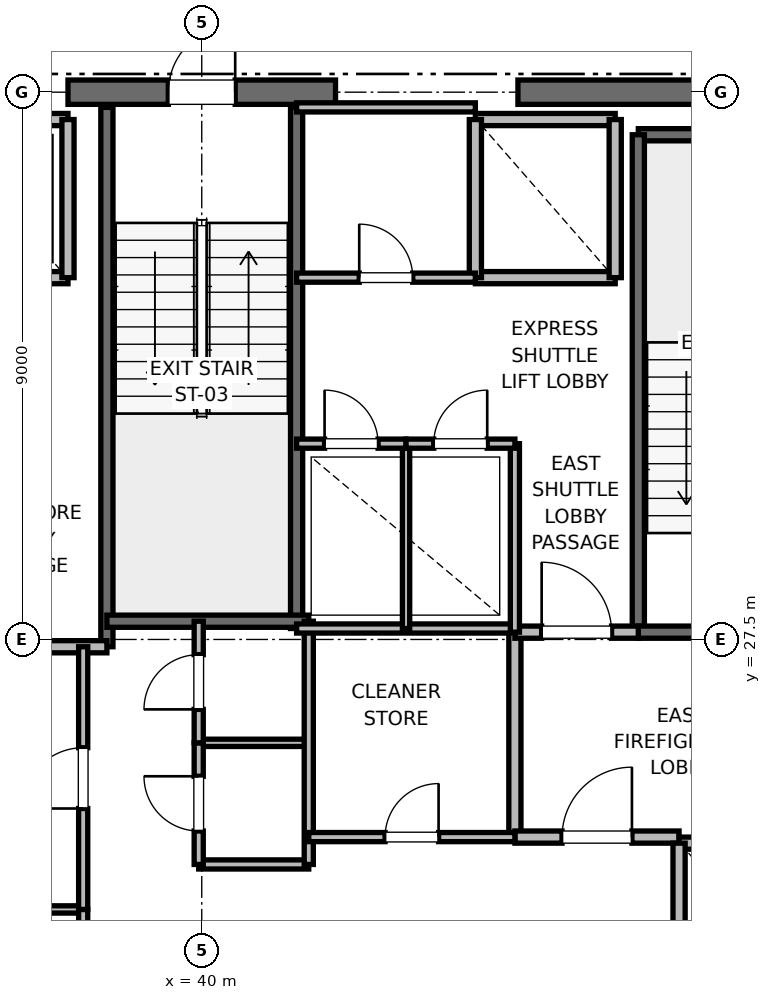
"""IFC4 building model, lengths in metres.
Left out: names, types, materials, properties, quantities, classifications, styles, units other than length and angle.
Written with IfcOpenShell. Run it as: python <this file> out.ifc"""

import sys

from ifc_helpers import new_model, si_unit, direction, frame, frame_2d, origin, place, context, subcontext, project, spatial, rectangle, extrude, element, fill, save


model = new_model("IFC4")
c1 = context("Model", 3, precision=1e-05, world=origin(), true_north=direction((0.0, 1.0)))
c2 = subcontext(c1, "Body", "Model", "MODEL_VIEW")
j1 = project(units=[si_unit("LENGTHUNIT", "METRE"), si_unit("PLANEANGLEUNIT", "RADIAN")], contexts=[c1])
p1 = place(None, origin())
s1 = spatial("IfcSite", under=j1, at=p1, CompositionType="ELEMENT")
p2 = place(p1, origin())
s2 = spatial("IfcBuilding", under=s1, at=p2, CompositionType="ELEMENT")
p3 = place(p2, frame((0.0, 0.0, 314.8)))
s3 = spatial("IfcBuildingStorey", under=s2, at=p3, CompositionType="ELEMENT", Elevation=314.8)
p4 = place(p3, frame((37.8, 36.5, 0.0), z_axis=(0.0, 0.0, 1.0), x_axis=(1.0, 0.0, 0.0)))
e1 = element("IfcWall", 1, at=p4, inside=s3, PredefinedType="SHEAR", context=c2, shape_type="SweptSolid", body=[
    extrude(rectangle(XDim=4.4, YDim=0.4, at=frame_2d((2.2, 0.0))), origin(), (0.0, 0.0, 1.0), 3.785),
])
p5 = place(p4, frame((1.65, 0.0, 0.0)))
e2 = element("IfcOpeningElement", 2, at=p5, cuts=e1, PredefinedType="OPENING", context=c2, shape_type="SweptSolid", body=[
    extrude(rectangle(XDim=1.1, YDim=2.15, at=frame_2d((0.55, 1.075))), frame((0.0, 0.2, 0.0), z_axis=(0.0, -1.0, 0.0), x_axis=(1.0, 0.0, 0.0)), (0.0, 0.0, 1.0), 0.4),
])
p6 = place(p3, frame((45.2, 36.5, 0.0), z_axis=(0.0, 0.0, 1.0), x_axis=(1.0, 0.0, 0.0)))
e3 = element("IfcWall", 3, at=p6, inside=s3, PredefinedType="SHEAR", context=c2, shape_type="SweptSolid", body=[
    extrude(rectangle(XDim=5.8, YDim=0.4, at=frame_2d((2.9, 0.0))), origin(), (0.0, 0.0, 1.0), 3.785),
])
p7 = place(p3, frame((47.18, 35.8, 0.0), z_axis=(0.0, 0.0, 1.0), x_axis=(1.0, 0.0, 0.0)))
e4 = element("IfcWall", 4, at=p7, inside=s3, PredefinedType="SOLIDWALL", context=c2, shape_type="SweptSolid", body=[
    extrude(rectangle(XDim=3.12, YDim=0.2, at=frame_2d((1.56, 0.0))), origin(), (0.0, 0.0, 1.0), 3.785),
])
p8 = place(p3, frame((47.18, 27.62, 0.0), z_axis=(0.0, 0.0, 1.0), x_axis=(0.0, 1.0, 0.0)))
e5 = element("IfcWall", 5, at=p8, inside=s3, PredefinedType="SOLIDWALL", context=c2, shape_type="SweptSolid", body=[
    extrude(rectangle(XDim=8.18, YDim=0.2, at=frame_2d((4.09, 0.0))), origin(), (0.0, 0.0, 1.0), 3.785),
])
p9 = place(p3, frame((47.18, 27.62, 0.0), z_axis=(0.0, 0.0, 1.0), x_axis=(1.0, 0.0, 0.0)))
e6 = element("IfcWall", 6, at=p9, inside=s3, PredefinedType="SOLIDWALL", context=c2, shape_type="SweptSolid", body=[
    extrude(rectangle(XDim=3.12, YDim=0.2, at=frame_2d((1.56, 0.0))), origin(), (0.0, 0.0, 1.0), 3.785),
])
p10 = place(p9, frame((1.01, 0.0, 0.0)))
e7 = element("IfcOpeningElement", 7, at=p10, cuts=e6, PredefinedType="OPENING", context=c2, shape_type="SweptSolid", body=[
    extrude(rectangle(XDim=1.1, YDim=2.15, at=frame_2d((0.55, 1.075))), frame((0.0, 0.1, 0.0), z_axis=(0.0, -1.0, 0.0), x_axis=(1.0, 0.0, 0.0)), (0.0, 0.0, 1.0), 0.2),
])
p11 = place(p3, frame((38.44, 27.38, 0.0), z_axis=(0.0, 0.0, 1.0), x_axis=(0.0, 1.0, 0.0)))
e8 = element("IfcWall", 8, at=p11, inside=s3, PredefinedType="SOLIDWALL", context=c2, shape_type="SweptSolid", body=[
    extrude(rectangle(XDim=8.87, YDim=0.2, at=frame_2d((4.435, 0.0))), origin(), (0.0, 0.0, 1.0), 3.785),
])
p12 = place(p3, frame((41.56, 27.68, 0.0), z_axis=(0.0, 0.0, 1.0), x_axis=(0.0, 1.0, 0.0)))
e9 = element("IfcWall", 9, at=p12, inside=s3, PredefinedType="SOLIDWALL", context=c2, shape_type="SweptSolid", body=[
    extrude(rectangle(XDim=8.57, YDim=0.2, at=frame_2d((4.285, 0.0))), origin(), (0.0, 0.0, 1.0), 3.785),
])
p13 = place(p3, frame((38.44, 27.8, 0.0), z_axis=(0.0, 0.0, 1.0), x_axis=(1.0, 0.0, 0.0)))
e10 = element("IfcWall", 10, at=p13, inside=s3, PredefinedType="SOLIDWALL", context=c2, shape_type="SweptSolid", body=[
    extrude(rectangle(XDim=3.32, YDim=0.2, at=frame_2d((1.66, 0.0))), origin(), (0.0, 0.0, 1.0), 3.785),
])
p14 = place(p3, frame((32.82, 27.38, 0.0), z_axis=(0.0, 0.0, 1.0), x_axis=(1.0, 0.0, 0.0)))
e11 = element("IfcWall", 11, at=p14, inside=s3, PredefinedType="PARTITIONING", context=c2, shape_type="SweptSolid", body=[
    extrude(rectangle(XDim=5.62, YDim=0.2, at=frame_2d((2.81, 0.0))), origin(), (0.0, 0.0, 1.0), 3.785),
])
p15 = place(p3, frame((45.15, 24.25, 0.0), z_axis=(0.0, 0.0, 1.0), x_axis=(0.0, 1.0, 0.0)))
e12 = element("IfcWall", 12, at=p15, inside=s3, PredefinedType="PARTITIONING", context=c2, shape_type="SweptSolid", body=[
    extrude(rectangle(XDim=3.37, YDim=0.2, at=frame_2d((1.685, 0.0))), origin(), (0.0, 0.0, 1.0), 3.785),
])
p16 = place(p3, frame((45.15, 24.25, 0.0), z_axis=(0.0, 0.0, 1.0), x_axis=(1.0, 0.0, 0.0)))
e13 = element("IfcWall", 13, at=p16, inside=s3, PredefinedType="PARTITIONING", context=c2, shape_type="SweptSolid", body=[
    extrude(rectangle(XDim=2.7, YDim=0.2, at=frame_2d((1.35, 0.0))), origin(), (0.0, 0.0, 1.0), 3.785),
])
p17 = place(p16, frame((0.775, 0.0, 0.0)))
e14 = element("IfcOpeningElement", 14, at=p17, cuts=e13, PredefinedType="OPENING", context=c2, shape_type="SweptSolid", body=[
    extrude(rectangle(XDim=1.15, YDim=2.2, at=frame_2d((0.575, 1.1))), frame((0.0, 0.1, 0.0), z_axis=(0.0, -1.0, 0.0), x_axis=(1.0, 0.0, 0.0)), (0.0, 0.0, 1.0), 0.2),
])
p18 = place(p3, frame((45.15, 27.62, 0.0), z_axis=(0.0, 0.0, 1.0), x_axis=(1.0, 0.0, 0.0)))
e15 = element("IfcWall", 15, at=p18, inside=s3, PredefinedType="PARTITIONING", context=c2, shape_type="SweptSolid", body=[
    extrude(rectangle(XDim=2.03, YDim=0.2, at=frame_2d((1.015, 0.0))), origin(), (0.0, 0.0, 1.0), 3.785),
])
p19 = place(p18, frame((0.44, 0.0, 0.0)))
e16 = element("IfcOpeningElement", 16, at=p19, cuts=e15, PredefinedType="OPENING", context=c2, shape_type="SweptSolid", body=[
    extrude(rectangle(XDim=1.15, YDim=2.2, at=frame_2d((0.575, 1.1))), frame((0.0, 0.1, 0.0), z_axis=(0.0, -1.0, 0.0), x_axis=(1.0, 0.0, 0.0)), (0.0, 0.0, 1.0), 0.2),
])
p20 = place(p3, frame((50.45, 24.15, 0.0), z_axis=(0.0, 0.0, 1.0), x_axis=(-1.0, 0.0, 0.0)))
e17 = element("IfcWall", 17, at=p20, inside=s3, PredefinedType="SOLIDWALL", context=c2, shape_type="SweptSolid", body=[
    extrude(rectangle(XDim=2.6, YDim=0.2, at=frame_2d((1.3, 0.0))), origin(), (0.0, 0.0, 1.0), 2.865),
])
p21 = place(p20, frame((0.75, 0.0, 0.0)))
e18 = element("IfcOpeningElement", 18, at=p21, cuts=e17, PredefinedType="OPENING", context=c2, shape_type="SweptSolid", body=[
    extrude(rectangle(XDim=1.1, YDim=2.2, at=frame_2d((0.55, 1.1))), frame((0.0, 0.1, 0.0), z_axis=(0.0, -1.0, 0.0), x_axis=(1.0, 0.0, 0.0)), (0.0, 0.0, 1.0), 0.2),
])
p22 = place(p3, frame((47.85, 24.15, 0.0), z_axis=(0.0, 0.0, 1.0), x_axis=(0.0, -1.0, 0.0)))
e19 = element("IfcWall", 19, at=p22, inside=s3, PredefinedType="SOLIDWALL", context=c2, shape_type="SweptSolid", body=[
    extrude(rectangle(XDim=3.0, YDim=0.2, at=frame_2d((1.5, 0.0))), origin(), (0.0, 0.0, 1.0), 3.785),
])
p23 = place(p3, frame((35.5, 33.45, 0.0), z_axis=(0.0, 0.0, 1.0), x_axis=(1.0, 0.0, 0.0)))
e20 = element("IfcWall", 20, at=p23, inside=s3, PredefinedType="SOLIDWALL", context=c2, shape_type="SweptSolid", body=[
    extrude(rectangle(XDim=2.3, YDim=0.2, at=frame_2d((1.15, 0.0))), origin(), (0.0, 0.0, 1.0), 3.785),
])
p24 = place(p23, frame((0.6, 0.0, 0.0)))
e21 = element("IfcOpeningElement", 21, at=p24, cuts=e20, PredefinedType="OPENING", context=c2, shape_type="SweptSolid", body=[
    extrude(rectangle(XDim=1.1, YDim=2.2, at=frame_2d((0.55, 1.1))), frame((0.0, 0.1, 0.0), z_axis=(0.0, -1.0, 0.0), x_axis=(1.0, 0.0, 0.0)), (0.0, 0.0, 1.0), 0.2),
])
p25 = place(p3, frame((37.8, 36.05, 0.0), z_axis=(0.0, 0.0, 1.0), x_axis=(-1.0, 0.0, 0.0)))
e22 = element("IfcWall", 22, at=p25, inside=s3, PredefinedType="SOLIDWALL", context=c2, shape_type="SweptSolid", body=[
    extrude(rectangle(XDim=2.3, YDim=0.2, at=frame_2d((1.15, 0.0))), origin(), (0.0, 0.0, 1.0), 2.865),
])
p26 = place(p3, frame((37.8, 33.45, 0.0), z_axis=(0.0, 0.0, 1.0), x_axis=(0.0, 1.0, 0.0)))
e23 = element("IfcWall", 23, at=p26, inside=s3, PredefinedType="SOLIDWALL", context=c2, shape_type="SweptSolid", body=[
    extrude(rectangle(XDim=2.6, YDim=0.2, at=frame_2d((1.3, 0.0))), origin(), (0.0, 0.0, 1.0), 2.865),
])
p27 = place(p3, frame((44.5, 33.45, 0.0), z_axis=(0.0, 0.0, 1.0), x_axis=(1.0, 0.0, 0.0)))
e24 = element("IfcWall", 24, at=p27, inside=s3, PredefinedType="SOLIDWALL", context=c2, shape_type="SweptSolid", body=[
    extrude(rectangle(XDim=2.3, YDim=0.2, at=frame_2d((1.15, 0.0))), origin(), (0.0, 0.0, 1.0), 3.785),
])
p28 = place(p3, frame((46.8, 36.05, 0.0), z_axis=(0.0, 0.0, 1.0), x_axis=(-1.0, 0.0, 0.0)))
e25 = element("IfcWall", 25, at=p28, inside=s3, PredefinedType="SOLIDWALL", context=c2, shape_type="SweptSolid", body=[
    extrude(rectangle(XDim=2.3, YDim=0.2, at=frame_2d((1.15, 0.0))), origin(), (0.0, 0.0, 1.0), 2.865),
])
p29 = place(p3, frame((44.5, 36.05, 0.0), z_axis=(0.0, 0.0, 1.0), x_axis=(0.0, -1.0, 0.0)))
e26 = element("IfcWall", 26, at=p29, inside=s3, PredefinedType="SOLIDWALL", context=c2, shape_type="SweptSolid", body=[
    extrude(rectangle(XDim=2.6, YDim=0.2, at=frame_2d((1.3, 0.0))), origin(), (0.0, 0.0, 1.0), 2.865),
])
p30 = place(p3, frame((46.8, 33.45, 0.0), z_axis=(0.0, 0.0, 1.0), x_axis=(0.0, 1.0, 0.0)))
e27 = element("IfcWall", 27, at=p30, inside=s3, PredefinedType="SOLIDWALL", context=c2, shape_type="SweptSolid", body=[
    extrude(rectangle(XDim=2.6, YDim=0.2, at=frame_2d((1.3, 0.0))), origin(), (0.0, 0.0, 1.0), 3.785),
])
p31 = place(p3, frame((39.95, 23.8, 0.0), z_axis=(0.0, 0.0, 1.0), x_axis=(1.0, 0.0, 0.0)))
e28 = element("IfcWall", 28, at=p31, inside=s3, PredefinedType="PARTITIONING", context=c2, shape_type="SweptSolid", body=[
    extrude(rectangle(XDim=1.81, YDim=0.15, at=frame_2d((0.905, 0.0))), origin(), (0.0, 0.0, 1.0), 2.85),
])
p32 = place(p3, frame((39.95, 25.8, 0.0), z_axis=(0.0, 0.0, 1.0), x_axis=(1.0, 0.0, 0.0)))
e29 = element("IfcWall", 29, at=p32, inside=s3, PredefinedType="PARTITIONING", context=c2, shape_type="SweptSolid", body=[
    extrude(rectangle(XDim=1.81, YDim=0.12, at=frame_2d((0.905, 0.0))), origin(), (0.0, 0.0, 1.0), 2.85),
])
p33 = place(p3, frame((41.76, 23.8, 0.0), z_axis=(0.0, 0.0, 1.0), x_axis=(0.0, 1.0, 0.0)))
e30 = element("IfcWall", 30, at=p33, inside=s3, PredefinedType="PARTITIONING", context=c2, shape_type="SweptSolid", body=[
    extrude(rectangle(XDim=4.0, YDim=0.15, at=frame_2d((2.0, 0.0))), origin(), (0.0, 0.0, 1.0), 2.85),
])
p34 = place(p3, frame((39.95, 23.8, 0.0), z_axis=(0.0, 0.0, 1.0), x_axis=(0.0, 1.0, 0.0)))
e31 = element("IfcWall", 31, at=p34, inside=s3, PredefinedType="PARTITIONING", context=c2, shape_type="SweptSolid", body=[
    extrude(rectangle(XDim=2.0, YDim=0.15, at=frame_2d((1.0, 0.0))), origin(), (0.0, 0.0, 1.0), 2.85),
])
p35 = place(p34, frame((0.55, 0.0, 0.0)))
e32 = element("IfcOpeningElement", 32, at=p35, cuts=e31, PredefinedType="OPENING", context=c2, shape_type="SweptSolid", body=[
    extrude(rectangle(XDim=0.9, YDim=2.1, at=frame_2d((0.45, 1.05))), frame((0.0, 0.075, 0.0), z_axis=(0.0, -1.0, 0.0), x_axis=(1.0, 0.0, 0.0)), (0.0, 0.0, 1.0), 0.15),
])
p36 = place(p3, frame((39.95, 25.8, 0.0), z_axis=(0.0, 0.0, 1.0), x_axis=(0.0, 1.0, 0.0)))
e33 = element("IfcWall", 33, at=p36, inside=s3, PredefinedType="PARTITIONING", context=c2, shape_type="SweptSolid", body=[
    extrude(rectangle(XDim=2.0, YDim=0.15, at=frame_2d((1.0, 0.0))), origin(), (0.0, 0.0, 1.0), 2.85),
])
p37 = place(p36, frame((0.55, 0.0, 0.0)))
e34 = element("IfcOpeningElement", 34, at=p37, cuts=e33, PredefinedType="OPENING", context=c2, shape_type="SweptSolid", body=[
    extrude(rectangle(XDim=0.9, YDim=2.1, at=frame_2d((0.45, 1.05))), frame((0.0, 0.075, 0.0), z_axis=(0.0, -1.0, 0.0), x_axis=(1.0, 0.0, 0.0)), (0.0, 0.0, 1.0), 0.15),
])
p38 = place(p3, frame((32.82, 23.06, 0.0), z_axis=(0.0, 0.0, 1.0), x_axis=(1.0, 0.0, 0.0)))
e35 = element("IfcWall", 35, at=p38, inside=s3, PredefinedType="PARTITIONING", context=c2, shape_type="SweptSolid", body=[
    extrude(rectangle(XDim=5.23, YDim=0.12, at=frame_2d((2.615, 0.0))), origin(), (0.0, 0.0, 1.0), 2.85),
])
p39 = place(p3, frame((38.05, 18.6, 0.0), z_axis=(0.0, 0.0, 1.0), x_axis=(0.0, 1.0, 0.0)))
e36 = element("IfcWall", 36, at=p39, inside=s3, PredefinedType="PARTITIONING", context=c2, shape_type="SweptSolid", body=[
    extrude(rectangle(XDim=4.46, YDim=0.15, at=frame_2d((2.23, 0.0))), origin(), (0.0, 0.0, 1.0), 2.85),
])
p40 = place(p39, frame((1.73, 0.0, 0.0)))
e37 = element("IfcOpeningElement", 37, at=p40, cuts=e36, PredefinedType="OPENING", context=c2, shape_type="SweptSolid", body=[
    extrude(rectangle(XDim=1.0, YDim=2.15, at=frame_2d((0.5, 1.075))), frame((0.0, 0.075, 0.0), z_axis=(0.0, -1.0, 0.0), x_axis=(1.0, 0.0, 0.0)), (0.0, 0.0, 1.0), 0.15),
])
p41 = place(p3, frame((38.05, 23.06, 0.0), z_axis=(0.0, 0.0, 1.0), x_axis=(0.0, 1.0, 0.0)))
e38 = element("IfcWall", 38, at=p41, inside=s3, PredefinedType="PARTITIONING", context=c2, shape_type="SweptSolid", body=[
    extrude(rectangle(XDim=4.32, YDim=0.15, at=frame_2d((2.16, 0.0))), origin(), (0.0, 0.0, 1.0), 2.85),
])
p42 = place(p41, frame((1.66, 0.0, 0.0)))
e39 = element("IfcOpeningElement", 39, at=p42, cuts=e38, PredefinedType="OPENING", context=c2, shape_type="SweptSolid", body=[
    extrude(rectangle(XDim=1.0, YDim=2.15, at=frame_2d((0.5, 1.075))), frame((0.0, 0.075, 0.0), z_axis=(0.0, -1.0, 0.0), x_axis=(1.0, 0.0, 0.0)), (0.0, 0.0, 1.0), 0.15),
])
p43 = place(p3, frame((41.56, 27.68, 0.0), z_axis=(0.0, 0.0, 1.0), x_axis=(1.0, 0.0, 0.0)))
e40 = element("IfcWall", 40, at=p43, inside=s3, PredefinedType="PARTITIONING", context=c2, shape_type="SweptSolid", body=[
    extrude(rectangle(XDim=3.59, YDim=0.15, at=frame_2d((1.795, 0.0))), origin(), (0.0, 0.0, 1.0), 2.85),
])
p44 = place(p3, frame((41.76, 24.25, 0.0), z_axis=(0.0, 0.0, 1.0), x_axis=(1.0, 0.0, 0.0)))
e41 = element("IfcWall", 41, at=p44, inside=s3, PredefinedType="PARTITIONING", context=c2, shape_type="SweptSolid", body=[
    extrude(rectangle(XDim=3.39, YDim=0.15, at=frame_2d((1.695, 0.0))), origin(), (0.0, 0.0, 1.0), 2.85),
])
p45 = place(p44, frame((1.255, 0.0, 0.0)))
e42 = element("IfcOpeningElement", 42, at=p45, cuts=e41, PredefinedType="OPENING", context=c2, shape_type="SweptSolid", body=[
    extrude(rectangle(XDim=0.88, YDim=2.1, at=frame_2d((0.44, 1.05))), frame((0.0, 0.075, 0.0), z_axis=(0.0, -1.0, 0.0), x_axis=(1.0, 0.0, 0.0)), (0.0, 0.0, 1.0), 0.15),
])
p46 = place(p3, frame((45.15, 27.62, 0.0), z_axis=(0.0, 0.0, 1.0), x_axis=(0.0, 1.0, 0.0)))
e43 = element("IfcWall", 43, at=p46, inside=s3, PredefinedType="PARTITIONING", context=c2, shape_type="SweptSolid", body=[
    extrude(rectangle(XDim=3.1, YDim=0.15, at=frame_2d((1.55, 0.0))), origin(), (0.0, 0.0, 1.0), 2.85),
])
p47 = place(p3, frame((43.36, 27.68, 0.0), z_axis=(0.0, 0.0, 1.0), x_axis=(0.0, 1.0, 0.0)))
e44 = element("IfcWall", 44, at=p47, inside=s3, PredefinedType="PARTITIONING", context=c2, shape_type="SweptSolid", body=[
    extrude(rectangle(XDim=3.04, YDim=0.12, at=frame_2d((1.52, 0.0))), origin(), (0.0, 0.0, 1.0), 2.85),
])
p48 = place(p3, frame((41.56, 30.72, 0.0), z_axis=(0.0, 0.0, 1.0), x_axis=(1.0, 0.0, 0.0)))
e45 = element("IfcWall", 45, at=p48, inside=s3, PredefinedType="PARTITIONING", context=c2, shape_type="SweptSolid", body=[
    extrude(rectangle(XDim=1.8, YDim=0.15, at=frame_2d((0.9, 0.0))), origin(), (0.0, 0.0, 1.0), 2.85),
])
p49 = place(p48, frame((0.46, 0.0, 0.0)))
e46 = element("IfcOpeningElement", 46, at=p49, cuts=e45, PredefinedType="OPENING", context=c2, shape_type="SweptSolid", body=[
    extrude(rectangle(XDim=0.88, YDim=2.1, at=frame_2d((0.44, 1.05))), frame((0.0, 0.075, 0.0), z_axis=(0.0, -1.0, 0.0), x_axis=(1.0, 0.0, 0.0)), (0.0, 0.0, 1.0), 0.15),
])
p50 = place(p3, frame((43.36, 30.72, 0.0), z_axis=(0.0, 0.0, 1.0), x_axis=(1.0, 0.0, 0.0)))
e47 = element("IfcWall", 47, at=p50, inside=s3, PredefinedType="PARTITIONING", context=c2, shape_type="SweptSolid", body=[
    extrude(rectangle(XDim=1.79, YDim=0.15, at=frame_2d((0.895, 0.0))), origin(), (0.0, 0.0, 1.0), 2.85),
])
p51 = place(p50, frame((0.455, 0.0, 0.0)))
e48 = element("IfcOpeningElement", 48, at=p51, cuts=e47, PredefinedType="OPENING", context=c2, shape_type="SweptSolid", body=[
    extrude(rectangle(XDim=0.88, YDim=2.1, at=frame_2d((0.44, 1.05))), frame((0.0, 0.075, 0.0), z_axis=(0.0, -1.0, 0.0), x_axis=(1.0, 0.0, 0.0)), (0.0, 0.0, 1.0), 0.15),
])
p52 = place(p3, frame((41.56, 36.25, 0.0), z_axis=(0.0, 0.0, 1.0), x_axis=(1.0, 0.0, 0.0)))
e49 = element("IfcWall", 49, at=p52, inside=s3, PredefinedType="PARTITIONING", context=c2, shape_type="SweptSolid", body=[
    extrude(rectangle(XDim=2.94, YDim=0.15, at=frame_2d((1.47, 0.0))), origin(), (0.0, 0.0, 1.0), 2.85),
])
p53 = place(p3, frame((41.56, 33.45, 0.0), z_axis=(0.0, 0.0, 1.0), x_axis=(1.0, 0.0, 0.0)))
e50 = element("IfcWall", 50, at=p53, inside=s3, PredefinedType="PARTITIONING", context=c2, shape_type="SweptSolid", body=[
    extrude(rectangle(XDim=2.94, YDim=0.15, at=frame_2d((1.47, 0.0))), origin(), (0.0, 0.0, 1.0), 2.85),
])
p54 = place(p53, frame((1.03, 0.0, 0.0)))
e51 = element("IfcOpeningElement", 51, at=p54, cuts=e50, PredefinedType="OPENING", context=c2, shape_type="SweptSolid", body=[
    extrude(rectangle(XDim=0.88, YDim=2.1, at=frame_2d((0.44, 1.05))), frame((0.0, 0.075, 0.0), z_axis=(0.0, -1.0, 0.0), x_axis=(1.0, 0.0, 0.0)), (0.0, 0.0, 1.0), 0.15),
])
p55 = place(p5, origin())
e52 = element("IfcDoor", 52, at=p55, inside=s3, OperationType="SINGLE_SWING_RIGHT", PredefinedType="DOOR", context=c2, shape_type="SweptSolid", body=[
    extrude(rectangle(XDim=1.1, YDim=2.15, at=frame_2d((0.55, 1.075))), frame((0.0, 0.025, 0.0), z_axis=(0.0, -1.0, 0.0), x_axis=(1.0, 0.0, 0.0)), (0.0, 0.0, 1.0), 0.05),
])
fill(e2, e52)
p56 = place(p17, origin())
e53 = element("IfcDoor", 53, at=p56, inside=s3, OperationType="SINGLE_SWING_RIGHT", PredefinedType="DOOR", context=c2, shape_type="SweptSolid", body=[
    extrude(rectangle(XDim=1.15, YDim=2.2, at=frame_2d((0.575, 1.1))), frame((0.0, 0.025, 0.0), z_axis=(0.0, -1.0, 0.0), x_axis=(1.0, 0.0, 0.0)), (0.0, 0.0, 1.0), 0.05),
])
fill(e14, e53)
p57 = place(p19, origin())
e54 = element("IfcDoor", 54, at=p57, inside=s3, OperationType="SINGLE_SWING_LEFT", PredefinedType="DOOR", context=c2, shape_type="SweptSolid", body=[
    extrude(rectangle(XDim=1.15, YDim=2.2, at=frame_2d((0.575, 1.1))), frame((0.0, 0.025, 0.0), z_axis=(0.0, -1.0, 0.0), x_axis=(1.0, 0.0, 0.0)), (0.0, 0.0, 1.0), 0.05),
])
fill(e16, e54)
p58 = place(p35, origin())
e55 = element("IfcDoor", 55, at=p58, inside=s3, OperationType="SINGLE_SWING_RIGHT", PredefinedType="DOOR", context=c2, shape_type="SweptSolid", body=[
    extrude(rectangle(XDim=0.9, YDim=2.1, at=frame_2d((0.45, 1.05))), frame((0.0, 0.025, 0.0), z_axis=(0.0, -1.0, 0.0), x_axis=(1.0, 0.0, 0.0)), (0.0, 0.0, 1.0), 0.05),
])
fill(e32, e55)
p59 = place(p37, origin())
e56 = element("IfcDoor", 56, at=p59, inside=s3, OperationType="SINGLE_SWING_LEFT", PredefinedType="DOOR", context=c2, shape_type="SweptSolid", body=[
    extrude(rectangle(XDim=0.9, YDim=2.1, at=frame_2d((0.45, 1.05))), frame((0.0, 0.025, 0.0), z_axis=(0.0, -1.0, 0.0), x_axis=(1.0, 0.0, 0.0)), (0.0, 0.0, 1.0), 0.05),
])
fill(e34, e56)
p60 = place(p42, origin())
e57 = element("IfcDoor", 57, at=p60, inside=s3, OperationType="SINGLE_SWING_LEFT", PredefinedType="DOOR", context=c2, shape_type="SweptSolid", body=[
    extrude(rectangle(XDim=1.0, YDim=2.15, at=frame_2d((0.5, 1.075))), frame((0.0, 0.025, 0.0), z_axis=(0.0, -1.0, 0.0), x_axis=(1.0, 0.0, 0.0)), (0.0, 0.0, 1.0), 0.05),
])
fill(e39, e57)
p61 = place(p45, origin())
e58 = element("IfcDoor", 58, at=p61, inside=s3, OperationType="SINGLE_SWING_RIGHT", PredefinedType="DOOR", context=c2, shape_type="SweptSolid", body=[
    extrude(rectangle(XDim=0.88, YDim=2.1, at=frame_2d((0.44, 1.05))), frame((0.0, 0.025, 0.0), z_axis=(0.0, -1.0, 0.0), x_axis=(1.0, 0.0, 0.0)), (0.0, 0.0, 1.0), 0.05),
])
fill(e42, e58)
p62 = place(p49, origin())
e59 = element("IfcDoor", 59, at=p62, inside=s3, OperationType="SINGLE_SWING_LEFT", PredefinedType="DOOR", context=c2, shape_type="SweptSolid", body=[
    extrude(rectangle(XDim=0.88, YDim=2.1, at=frame_2d((0.44, 1.05))), frame((0.0, 0.025, 0.0), z_axis=(0.0, -1.0, 0.0), x_axis=(1.0, 0.0, 0.0)), (0.0, 0.0, 1.0), 0.05),
])
fill(e46, e59)
p63 = place(p51, origin())
e60 = element("IfcDoor", 60, at=p63, inside=s3, OperationType="SINGLE_SWING_RIGHT", PredefinedType="DOOR", context=c2, shape_type="SweptSolid", body=[
    extrude(rectangle(XDim=0.88, YDim=2.1, at=frame_2d((0.44, 1.05))), frame((0.0, 0.025, 0.0), z_axis=(0.0, -1.0, 0.0), x_axis=(1.0, 0.0, 0.0)), (0.0, 0.0, 1.0), 0.05),
])
fill(e48, e60)
p64 = place(p54, origin())
e61 = element("IfcDoor", 61, at=p64, inside=s3, OperationType="SINGLE_SWING_LEFT", PredefinedType="DOOR", context=c2, shape_type="SweptSolid", body=[
    extrude(rectangle(XDim=0.88, YDim=2.1, at=frame_2d((0.44, 1.05))), frame((0.0, 0.025, 0.0), z_axis=(0.0, -1.0, 0.0), x_axis=(1.0, 0.0, 0.0)), (0.0, 0.0, 1.0), 0.05),
])
fill(e51, e61)
save(model, sys.argv[1])
